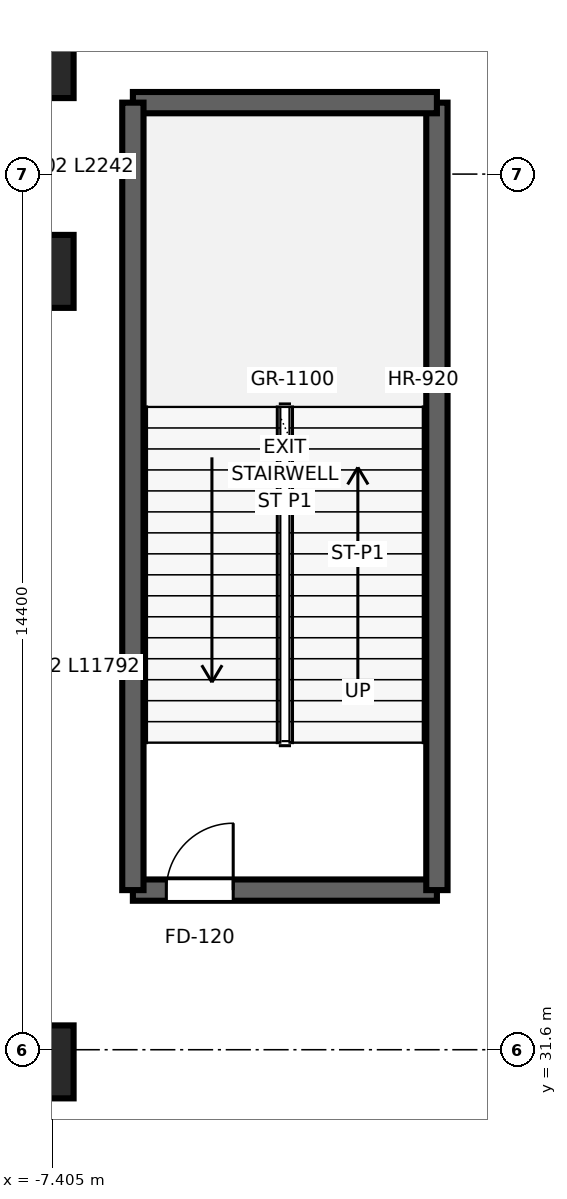
"""IFC4 building model, lengths in metres.
Left out: names, types, materials, properties, quantities, classifications, styles, units other than length and angle.
Written with IfcOpenShell. Run it as: python <this file> out.ifc"""

import sys

from ifc_helpers import new_model, si_unit, direction, frame, frame_2d, origin, origin_2d, place, context, subcontext, project, spatial, rectangle, extrude, source, transform, mapped, element, fill, save


model = new_model("IFC4")
c1 = context("Model", 3, precision=1e-05, world=origin(), true_north=direction((0.0, 1.0)))
c2 = subcontext(c1, "Body", "Model", "MODEL_VIEW")
j1 = project(units=[si_unit("LENGTHUNIT", "METRE"), si_unit("PLANEANGLEUNIT", "RADIAN")], contexts=[c1])
p1 = place(None, origin())
s1 = spatial("IfcSite", under=j1, at=p1, CompositionType="ELEMENT")
p2 = place(p1, origin())
s2 = spatial("IfcBuilding", under=s1, at=p2, CompositionType="ELEMENT")
p3 = place(p2, frame((0.0, 0.0, 16.0)))
s3 = spatial("IfcBuildingStorey", under=s2, at=p3, CompositionType="ELEMENT", Elevation=16.0)
p4 = place(p3, frame((-6.075, 34.225, 0.0), z_axis=(0.0, 0.0, 1.0), x_axis=(1.0, 0.0, 0.0)))
e1 = element("IfcWall", 1, at=p4, inside=s3, PredefinedType="SHEAR", context=c2, shape_type="SweptSolid", body=[
    extrude(rectangle(XDim=5.0, YDim=0.35, at=frame_2d((2.5, 0.0))), origin(), (0.0, 0.0, 1.0), 6.4),
])
p5 = place(p4, frame((0.55, 0.0, 0.0)))
e2 = element("IfcOpeningElement", 2, at=p5, cuts=e1, PredefinedType="OPENING", context=c2, shape_type="SweptSolid", body=[
    extrude(rectangle(XDim=1.1, YDim=2.12, at=frame_2d((0.55, 1.06))), frame((0.0, 0.185, 0.0), z_axis=(0.0, -1.0, 0.0), x_axis=(1.0, 0.0, 0.0)), (0.0, 0.0, 1.0), 0.37),
])
p6 = place(p3, frame((-1.075, 34.225, 0.0), z_axis=(0.0, 0.0, 1.0), x_axis=(0.0, 1.0, 0.0)))
e3 = element("IfcWall", 3, at=p6, inside=s3, PredefinedType="SHEAR", context=c2, shape_type="SweptSolid", body=[
    extrude(rectangle(XDim=12.95, YDim=0.35, at=frame_2d((6.475, 0.0))), origin(), (0.0, 0.0, 1.0), 6.4),
])
p7 = place(p3, frame((-1.075, 47.175, 0.0), z_axis=(0.0, 0.0, 1.0), x_axis=(-1.0, 0.0, 0.0)))
e4 = element("IfcWall", 4, at=p7, inside=s3, PredefinedType="SHEAR", context=c2, shape_type="SweptSolid", body=[
    extrude(rectangle(XDim=5.0, YDim=0.35, at=frame_2d((2.5, 0.0))), origin(), (0.0, 0.0, 1.0), 6.4),
])
p8 = place(p3, frame((-6.075, 47.175, 0.0), z_axis=(0.0, 0.0, 1.0), x_axis=(0.0, -1.0, 0.0)))
e5 = element("IfcWall", 5, at=p8, inside=s3, PredefinedType="SHEAR", context=c2, shape_type="SweptSolid", body=[
    extrude(rectangle(XDim=12.95, YDim=0.35, at=frame_2d((6.475, 0.0))), origin(), (0.0, 0.0, 1.0), 6.4),
])
m1 = source(origin(), c2, "Body", "SweptSolid", [
    extrude(rectangle(XDim=1.2, YDim=1.2, at=origin_2d()), origin(), (0.0, 0.0, 1.0), 6.4),
])
for number, where, z_axis, x_axis in (
    (6, (-7.65, 31.4, 0.0), (0.0, 0.0, 1.0), (1.0, 0.0, 0.0)),
    (7, (-7.65, 44.4, 0.0), (0.0, 0.0, 1.0), (1.0, 0.0, 0.0)),
    (8, (-7.65, 47.85, 0.0), (0.0, 0.0, 1.0), (1.0, 0.0, 0.0)),
):
    element("IfcColumn", number, at=place(p3, frame(where, z_axis=z_axis, x_axis=x_axis)), inside=s3, PredefinedType="COLUMN", context=c2, shape_type="MappedRepresentation", body=[
        mapped(m1, transform((0.0, 0.0, 0.0), x_axis=(1.0, 0.0, 0.0), y_axis=(0.0, 1.0, 0.0), z_axis=(0.0, 0.0, 1.0), scale=1.0)),
    ])
m2 = source(origin(), c2, "Body", "SweptSolid", [
    extrude(rectangle(XDim=1.1, YDim=2.12, at=frame_2d((0.55, 1.06))), frame((0.0, 0.025, 0.0), z_axis=(0.0, -1.0, 0.0), x_axis=(1.0, 0.0, 0.0)), (0.0, 0.0, 1.0), 0.05),
])
p9 = place(p5, origin())
e9 = element("IfcDoor", 9, at=p9, inside=s3, OperationType="SINGLE_SWING_RIGHT", PredefinedType="DOOR", context=c2, shape_type="MappedRepresentation", body=[
    mapped(m2, transform((0.0, 0.0, 0.0), x_axis=(1.0, 0.0, 0.0), y_axis=(0.0, 1.0, 0.0), z_axis=(0.0, 0.0, 1.0), scale=1.0)),
])
fill(e2, e9)
save(model, sys.argv[1])
